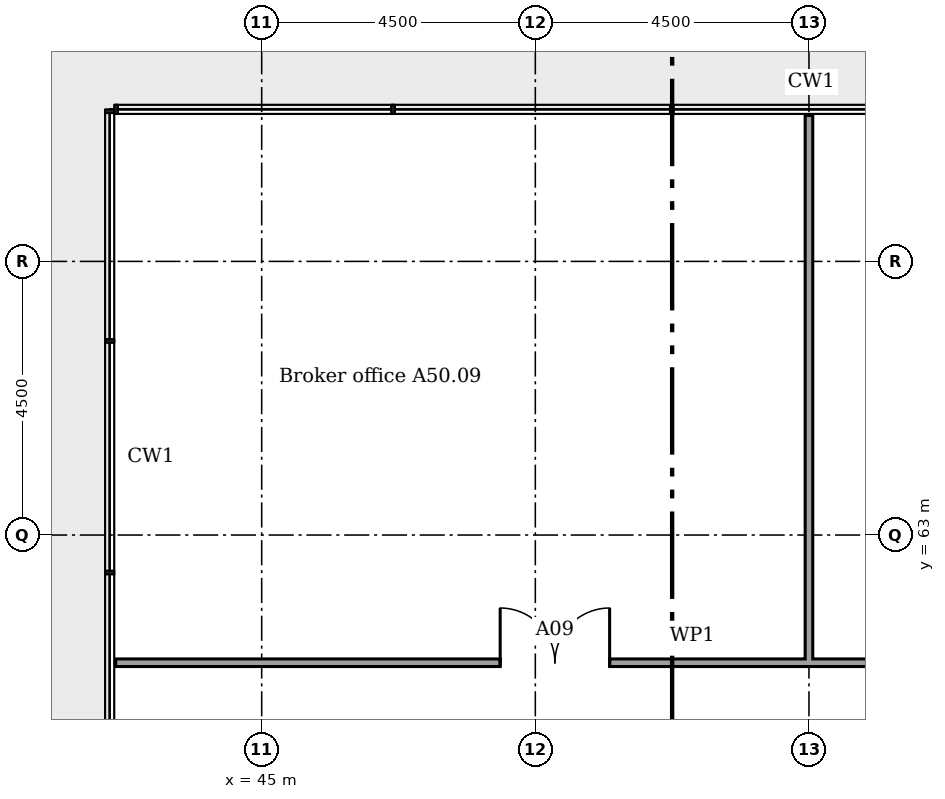
"""IFC4 building model, lengths in metres.
Left out: names, types, materials, properties, quantities, classifications, styles, units other than length and angle.
Written with IfcOpenShell. Run it as: python <this file> out.ifc"""

import sys

from ifc_helpers import new_model, si_unit, direction, frame, frame_2d, origin, place, context, subcontext, project, spatial, rectangle, extrude, element, fill, save


model = new_model("IFC4")
c1 = context("Model", 3, precision=1e-05, world=origin(), true_north=direction((0.0, 1.0)))
c2 = subcontext(c1, "Body", "Model", "MODEL_VIEW")
j1 = project(units=[si_unit("LENGTHUNIT", "METRE"), si_unit("PLANEANGLEUNIT", "RADIAN")], contexts=[c1])
p1 = place(None, origin())
s1 = spatial("IfcSite", under=j1, at=p1, CompositionType="ELEMENT")
p2 = place(p1, origin())
s2 = spatial("IfcBuilding", under=s1, at=p2, CompositionType="ELEMENT")
p3 = place(p2, frame((0.0, 0.0, 199.2)))
s3 = spatial("IfcBuildingStorey", under=s2, at=p3, CompositionType="ELEMENT", Elevation=199.2)
p4 = place(p3, frame((42.6, 60.9, 0.0)))
e1 = element("IfcWall", 1, at=p4, inside=s3, PredefinedType="PARTITIONING", context=c2, shape_type="SweptSolid", body=[
    extrude(rectangle(XDim=18.962, YDim=0.125, at=frame_2d((9.481, 0.0))), origin(), (0.0, 0.0, 1.0), 3.45),
])
p5 = place(p4, frame((12.695, 0.0, 0.0)))
e2 = element("IfcOpeningElement", 2, at=p5, cuts=e1, PredefinedType="OPENING", context=c2, shape_type="SweptSolid", body=[
    extrude(rectangle(XDim=1.0, YDim=2.1, at=frame_2d((0.5, 1.05))), frame((0.0, 0.073, 0.0), z_axis=(0.0, -1.0, 0.0), x_axis=(1.0, 0.0, 0.0)), (0.0, 0.0, 1.0), 0.145),
])
p6 = place(p4, frame((6.322, 0.0, 0.0)))
e3 = element("IfcOpeningElement", 3, at=p6, cuts=e1, PredefinedType="OPENING", context=c2, shape_type="SweptSolid", body=[
    extrude(rectangle(XDim=1.8, YDim=2.1, at=frame_2d((0.9, 1.05))), frame((0.0, 0.073, 0.0), z_axis=(0.0, -1.0, 0.0), x_axis=(1.0, 0.0, 0.0)), (0.0, 0.0, 1.0), 0.145),
])
p7 = place(p3, frame((54.0, 60.9, 0.0), z_axis=(0.0, 0.0, 1.0), x_axis=(0.0, 1.0, 0.0)))
e4 = element("IfcWall", 4, at=p7, inside=s3, PredefinedType="PARTITIONING", context=c2, shape_type="SweptSolid", body=[
    extrude(rectangle(XDim=9.0, YDim=0.125, at=frame_2d((4.5, 0.0))), origin(), (0.0, 0.0, 1.0), 2.772),
])
p8 = place(p6, origin())
e5 = element("IfcDoor", 5, at=p8, inside=s3, OperationType="DOUBLE_DOOR_SINGLE_SWING", PredefinedType="DOOR", context=c2, shape_type="SweptSolid", body=[
    extrude(rectangle(XDim=1.8, YDim=2.1, at=frame_2d((0.9, 1.05))), frame((0.0, 0.025, 0.0), z_axis=(0.0, -1.0, 0.0), x_axis=(1.0, 0.0, 0.0)), (0.0, 0.0, 1.0), 0.05),
])
fill(e3, e5)
save(model, sys.argv[1])
